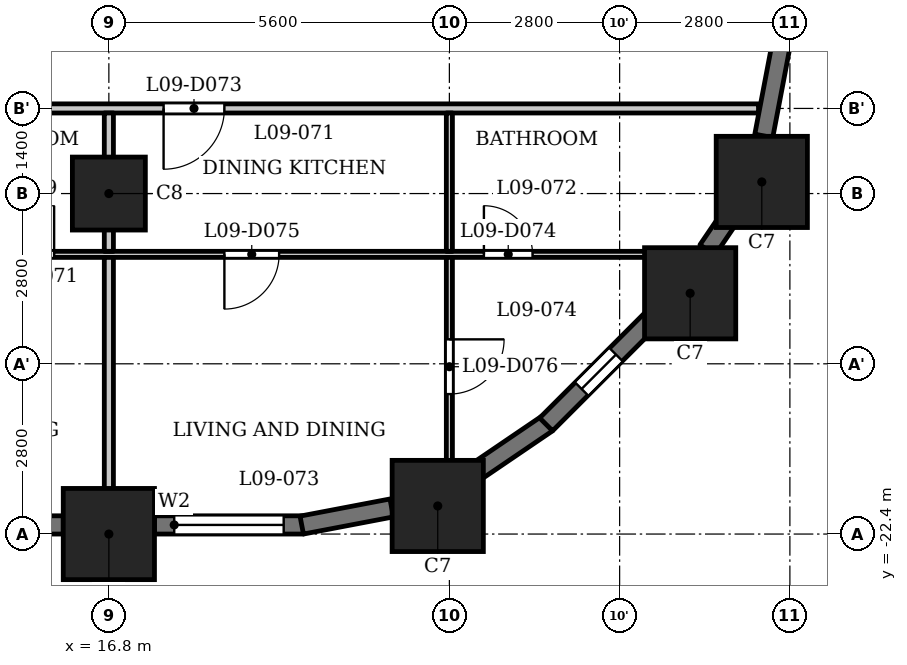
"""IFC4 building model, lengths in metres.
Left out: names, types, materials, properties, quantities, classifications, styles, units other than length and angle.
Written with IfcOpenShell. Run it as: python <this file> out.ifc"""

import sys

from ifc_helpers import new_model, si_unit, direction, frame, frame_2d, origin, origin_2d, place, context, subcontext, project, spatial, rectangle, extrude, element, fill, save


model = new_model("IFC4")
c1 = context("Model", 3, precision=1e-05, world=origin(), true_north=direction((0.0, 1.0)))
c2 = subcontext(c1, "Body", "Model", "MODEL_VIEW")
j1 = project(units=[si_unit("LENGTHUNIT", "METRE"), si_unit("PLANEANGLEUNIT", "RADIAN")], contexts=[c1])
p1 = place(None, origin())
s1 = spatial("IfcSite", under=j1, at=p1, CompositionType="ELEMENT")
p2 = place(p1, origin())
s2 = spatial("IfcBuilding", under=s1, at=p2, CompositionType="ELEMENT")
p3 = place(p2, frame((0.0, 0.0, 41.0)))
s3 = spatial("IfcBuildingStorey", under=s2, at=p3, CompositionType="ELEMENT", Elevation=41.0)
for number, where, z_axis, x_axis in (
    (1, (16.8, -22.4, 0.0), (0.0, 0.0, 1.0), (1.0, 0.0, 0.0)),
    (2, (22.209, -21.938, 0.0), (0.0, 0.0, 1.0), (1.0, 0.0, 0.0)),
    (3, (26.36, -18.44, 0.0), (0.0, 0.0, 1.0), (1.0, 0.0, 0.0)),
    (4, (27.538, -16.609, 0.0), (0.0, 0.0, 1.0), (1.0, 0.0, 0.0)),
):
    element("IfcColumn", number, at=place(p3, frame(where, z_axis=z_axis, x_axis=x_axis)), inside=s3, PredefinedType="COLUMN", context=c2, shape_type="SweptSolid", body=[
        extrude(rectangle(XDim=1.5, YDim=1.5, at=origin_2d()), origin(), (0.0, 0.0, 1.0), 3.5),
    ])
p4 = place(p3, frame((16.8, -16.8, 0.0), z_axis=(0.0, 0.0, 1.0), x_axis=(1.0, 0.0, 0.0)))
e5 = element("IfcColumn", 5, at=p4, inside=s3, PredefinedType="COLUMN", context=c2, shape_type="SweptSolid", body=[
    extrude(rectangle(XDim=1.2, YDim=1.2, at=origin_2d()), origin(), (0.0, 0.0, 1.0), 3.5),
])
p5 = place(p3, frame((11.95, -22.25, 0.0), z_axis=(0.0, 0.0, 1.0), x_axis=(1.0, 0.0, 0.0)))
e6 = element("IfcWall", 6, at=p5, inside=s3, PredefinedType="SOLIDWALL", context=c2, shape_type="SweptSolid", body=[
    extrude(rectangle(XDim=4.1, YDim=0.3, at=frame_2d((2.05, 0.0))), origin(), (0.0, 0.0, 1.0), 2.35),
])
p6 = place(p5, frame((0.75, 0.0, 0.9)))
e7 = element("IfcOpeningElement", 7, at=p6, cuts=e6, PredefinedType="OPENING", context=c2, shape_type="SweptSolid", body=[
    extrude(rectangle(XDim=2.6, YDim=1.25, at=frame_2d((1.3, 0.625))), frame((0.0, 0.16, 0.0), z_axis=(0.0, -1.0, 0.0), x_axis=(1.0, 0.0, 0.0)), (0.0, 0.0, 1.0), 0.32),
])
p7 = place(p3, frame((17.55, -22.25, 0.0), z_axis=(0.0, 0.0, 1.0), x_axis=(1.0, 0.0, 0.0)))
e8 = element("IfcWall", 8, at=p7, inside=s3, PredefinedType="SOLIDWALL", context=c2, shape_type="SweptSolid", body=[
    extrude(rectangle(XDim=2.45, YDim=0.3, at=frame_2d((1.225, 0.0))), origin(), (0.0, 0.0, 1.0), 2.35),
])
p8 = place(p7, frame((0.325, 0.0, 0.9)))
e9 = element("IfcOpeningElement", 9, at=p8, cuts=e8, PredefinedType="OPENING", context=c2, shape_type="SweptSolid", body=[
    extrude(rectangle(XDim=1.8, YDim=1.25, at=frame_2d((0.9, 0.625))), frame((0.0, 0.16, 0.0), z_axis=(0.0, -1.0, 0.0), x_axis=(1.0, 0.0, 0.0)), (0.0, 0.0, 1.0), 0.32),
])
for number, where, z_axis, x_axis in (
    (10, (19.972, -22.253, 0.0), (0.0, 0.0, 1.0), (0.982, 0.187, 0.0)),
    (11, (22.767, -21.426, 0.0), (0.0, 0.0, 1.0), (0.827, 0.562, 0.0)),
):
    element("IfcWall", number, at=place(p3, frame(where, z_axis=z_axis, x_axis=x_axis)), inside=s3, PredefinedType="SOLIDWALL", context=c2, shape_type="SweptSolid", body=[
        extrude(rectangle(XDim=1.506, YDim=0.3, at=frame_2d((0.753, 0.0))), origin(), (0.0, 0.0, 1.0), 2.35),
    ])
p9 = place(p3, frame((23.991, -20.597, 0.0), z_axis=(0.0, 0.0, 1.0), x_axis=(0.707106781187, 0.707106781187, 0.0)))
e12 = element("IfcWall", 12, at=p9, inside=s3, PredefinedType="SOLIDWALL", context=c2, shape_type="SweptSolid", body=[
    extrude(rectangle(XDim=2.45, YDim=0.3, at=frame_2d((1.225, 0.0))), origin(), (0.0, 0.0, 1.0), 2.35),
])
p10 = place(p9, frame((0.825, 0.0, 0.6)))
e13 = element("IfcOpeningElement", 13, at=p10, cuts=e12, PredefinedType="OPENING", context=c2, shape_type="SweptSolid", body=[
    extrude(rectangle(XDim=0.8, YDim=1.55, at=frame_2d((0.4, 0.775))), frame((0.0, 0.16, 0.0), z_axis=(0.0, -1.0, 0.0), x_axis=(1.0, 0.0, 0.0)), (0.0, 0.0, 1.0), 0.32),
])
p11 = place(p3, frame((26.645, -17.727, 0.0), z_axis=(0.0, 0.0, 1.0), x_axis=(0.562083182981, 0.827080706709, 0.0)))
e14 = element("IfcWall", 14, at=p11, inside=s3, PredefinedType="SOLIDWALL", context=c2, shape_type="SweptSolid", body=[
    extrude(rectangle(XDim=0.677, YDim=0.3, at=frame_2d((0.339, 0.0))), origin(), (0.0, 0.0, 1.0), 3.2),
])
p12 = place(p3, frame((27.571, -15.851, 0.0), z_axis=(0.0, 0.0, 1.0), x_axis=(0.187223837635, 0.982317277982, 0.0)))
e15 = element("IfcWall", 15, at=p12, inside=s3, PredefinedType="SOLIDWALL", context=c2, shape_type="SweptSolid", body=[
    extrude(rectangle(XDim=1.506, YDim=0.3, at=frame_2d((0.753, 0.0))), origin(), (0.0, 0.0, 1.0), 2.35),
])
p13 = place(p3, frame((-26.394, -17.8, 0.0), z_axis=(0.0, 0.0, 1.0), x_axis=(1.0, 0.0, 0.0)))
e16 = element("IfcWall", 16, at=p13, inside=s3, PredefinedType="PARTITIONING", context=c2, shape_type="SweptSolid", body=[
    extrude(rectangle(XDim=53.126, YDim=0.1, at=frame_2d((26.563, 0.0))), origin(), (0.0, 0.0, 1.0), 3.2),
])
p14 = place(p13, frame((0.794, 0.0, 0.0)))
e17 = element("IfcOpeningElement", 17, at=p14, cuts=e16, PredefinedType="OPENING", context=c2, shape_type="SweptSolid", body=[
    extrude(rectangle(XDim=0.8, YDim=2.1, at=frame_2d((0.4, 1.05))), frame((0.0, 0.06, 0.0), z_axis=(0.0, -1.0, 0.0), x_axis=(1.0, 0.0, 0.0)), (0.0, 0.0, 1.0), 0.12),
])
p15 = place(p13, frame((5.644, 0.0, 0.0)))
e18 = element("IfcOpeningElement", 18, at=p15, cuts=e16, PredefinedType="OPENING", context=c2, shape_type="SweptSolid", body=[
    extrude(rectangle(XDim=0.9, YDim=2.1, at=frame_2d((0.45, 1.05))), frame((0.0, 0.06, 0.0), z_axis=(0.0, -1.0, 0.0), x_axis=(1.0, 0.0, 0.0)), (0.0, 0.0, 1.0), 0.12),
])
p16 = place(p13, frame((10.394, 0.0, 0.0)))
e19 = element("IfcOpeningElement", 19, at=p16, cuts=e16, PredefinedType="OPENING", context=c2, shape_type="SweptSolid", body=[
    extrude(rectangle(XDim=0.8, YDim=2.1, at=frame_2d((0.4, 1.05))), frame((0.0, 0.06, 0.0), z_axis=(0.0, -1.0, 0.0), x_axis=(1.0, 0.0, 0.0)), (0.0, 0.0, 1.0), 0.12),
])
p17 = place(p13, frame((13.244, 0.0, 0.0)))
e20 = element("IfcOpeningElement", 20, at=p17, cuts=e16, PredefinedType="OPENING", context=c2, shape_type="SweptSolid", body=[
    extrude(rectangle(XDim=0.9, YDim=2.1, at=frame_2d((0.45, 1.05))), frame((0.0, 0.06, 0.0), z_axis=(0.0, -1.0, 0.0), x_axis=(1.0, 0.0, 0.0)), (0.0, 0.0, 1.0), 0.12),
])
p18 = place(p13, frame((23.944, 0.0, 0.0)))
e21 = element("IfcOpeningElement", 21, at=p18, cuts=e16, PredefinedType="OPENING", context=c2, shape_type="SweptSolid", body=[
    extrude(rectangle(XDim=0.8, YDim=2.1, at=frame_2d((0.4, 1.05))), frame((0.0, 0.06, 0.0), z_axis=(0.0, -1.0, 0.0), x_axis=(1.0, 0.0, 0.0)), (0.0, 0.0, 1.0), 0.12),
])
p19 = place(p13, frame((22.194, 0.0, 0.0)))
e22 = element("IfcOpeningElement", 22, at=p19, cuts=e16, PredefinedType="OPENING", context=c2, shape_type="SweptSolid", body=[
    extrude(rectangle(XDim=0.9, YDim=2.1, at=frame_2d((0.45, 1.05))), frame((0.0, 0.06, 0.0), z_axis=(0.0, -1.0, 0.0), x_axis=(1.0, 0.0, 0.0)), (0.0, 0.0, 1.0), 0.12),
])
p20 = place(p13, frame((16.594, 0.0, 0.0)))
e23 = element("IfcOpeningElement", 23, at=p20, cuts=e16, PredefinedType="OPENING", context=c2, shape_type="SweptSolid", body=[
    extrude(rectangle(XDim=0.9, YDim=2.1, at=frame_2d((0.45, 1.05))), frame((0.0, 0.06, 0.0), z_axis=(0.0, -1.0, 0.0), x_axis=(1.0, 0.0, 0.0)), (0.0, 0.0, 1.0), 0.12),
])
p21 = place(p13, frame((18.844, 0.0, 0.0)))
e24 = element("IfcOpeningElement", 24, at=p21, cuts=e16, PredefinedType="OPENING", context=c2, shape_type="SweptSolid", body=[
    extrude(rectangle(XDim=0.9, YDim=2.1, at=frame_2d((0.45, 1.05))), frame((0.0, 0.06, 0.0), z_axis=(0.0, -1.0, 0.0), x_axis=(1.0, 0.0, 0.0)), (0.0, 0.0, 1.0), 0.12),
])
p22 = place(p13, frame((30.544, 0.0, 0.0)))
e25 = element("IfcOpeningElement", 25, at=p22, cuts=e16, PredefinedType="OPENING", context=c2, shape_type="SweptSolid", body=[
    extrude(rectangle(XDim=0.8, YDim=2.1, at=frame_2d((0.4, 1.05))), frame((0.0, 0.06, 0.0), z_axis=(0.0, -1.0, 0.0), x_axis=(1.0, 0.0, 0.0)), (0.0, 0.0, 1.0), 0.12),
])
p23 = place(p13, frame((27.294, 0.0, 0.0)))
e26 = element("IfcOpeningElement", 26, at=p23, cuts=e16, PredefinedType="OPENING", context=c2, shape_type="SweptSolid", body=[
    extrude(rectangle(XDim=0.9, YDim=2.1, at=frame_2d((0.45, 1.05))), frame((0.0, 0.06, 0.0), z_axis=(0.0, -1.0, 0.0), x_axis=(1.0, 0.0, 0.0)), (0.0, 0.0, 1.0), 0.12),
])
p24 = place(p13, frame((35.894, 0.0, 0.0)))
e27 = element("IfcOpeningElement", 27, at=p24, cuts=e16, PredefinedType="OPENING", context=c2, shape_type="SweptSolid", body=[
    extrude(rectangle(XDim=0.8, YDim=2.1, at=frame_2d((0.4, 1.05))), frame((0.0, 0.06, 0.0), z_axis=(0.0, -1.0, 0.0), x_axis=(1.0, 0.0, 0.0)), (0.0, 0.0, 1.0), 0.12),
])
p25 = place(p13, frame((33.644, 0.0, 0.0)))
e28 = element("IfcOpeningElement", 28, at=p25, cuts=e16, PredefinedType="OPENING", context=c2, shape_type="SweptSolid", body=[
    extrude(rectangle(XDim=0.9, YDim=2.1, at=frame_2d((0.45, 1.05))), frame((0.0, 0.06, 0.0), z_axis=(0.0, -1.0, 0.0), x_axis=(1.0, 0.0, 0.0)), (0.0, 0.0, 1.0), 0.12),
])
p26 = place(p13, frame((41.494, 0.0, 0.0)))
e29 = element("IfcOpeningElement", 29, at=p26, cuts=e16, PredefinedType="OPENING", context=c2, shape_type="SweptSolid", body=[
    extrude(rectangle(XDim=0.8, YDim=2.1, at=frame_2d((0.4, 1.05))), frame((0.0, 0.06, 0.0), z_axis=(0.0, -1.0, 0.0), x_axis=(1.0, 0.0, 0.0)), (0.0, 0.0, 1.0), 0.12),
])
p27 = place(p13, frame((38.744, 0.0, 0.0)))
e30 = element("IfcOpeningElement", 30, at=p27, cuts=e16, PredefinedType="OPENING", context=c2, shape_type="SweptSolid", body=[
    extrude(rectangle(XDim=0.9, YDim=2.1, at=frame_2d((0.45, 1.05))), frame((0.0, 0.06, 0.0), z_axis=(0.0, -1.0, 0.0), x_axis=(1.0, 0.0, 0.0)), (0.0, 0.0, 1.0), 0.12),
])
p28 = place(p13, frame((49.362, 0.0, 0.0)))
e31 = element("IfcOpeningElement", 31, at=p28, cuts=e16, PredefinedType="OPENING", context=c2, shape_type="SweptSolid", body=[
    extrude(rectangle(XDim=0.8, YDim=2.1, at=frame_2d((0.4, 1.05))), frame((0.0, 0.06, 0.0), z_axis=(0.0, -1.0, 0.0), x_axis=(1.0, 0.0, 0.0)), (0.0, 0.0, 1.0), 0.12),
])
p29 = place(p13, frame((45.094, 0.0, 0.0)))
e32 = element("IfcOpeningElement", 32, at=p29, cuts=e16, PredefinedType="OPENING", context=c2, shape_type="SweptSolid", body=[
    extrude(rectangle(XDim=0.9, YDim=2.1, at=frame_2d((0.45, 1.05))), frame((0.0, 0.06, 0.0), z_axis=(0.0, -1.0, 0.0), x_axis=(1.0, 0.0, 0.0)), (0.0, 0.0, 1.0), 0.12),
])
p30 = place(p3, frame((-27.484, -15.4, 0.0), z_axis=(0.0, 0.0, 1.0), x_axis=(1.0, 0.0, 0.0)))
e33 = element("IfcWall", 33, at=p30, inside=s3, PredefinedType="PARTITIONING", context=c2, shape_type="SweptSolid", body=[
    extrude(rectangle(XDim=54.968, YDim=0.15, at=frame_2d((27.484, 0.0))), origin(), (0.0, 0.0, 1.0), 3.2),
])
p31 = place(p30, frame((5.734, 0.0, 0.0)))
e34 = element("IfcOpeningElement", 34, at=p31, cuts=e33, PredefinedType="OPENING", context=c2, shape_type="SweptSolid", body=[
    extrude(rectangle(XDim=1.0, YDim=2.1, at=frame_2d((0.5, 1.05))), frame((0.0, 0.085, 0.0), z_axis=(0.0, -1.0, 0.0), x_axis=(1.0, 0.0, 0.0)), (0.0, 0.0, 1.0), 0.17),
])
p32 = place(p30, frame((13.334, 0.0, 0.0)))
e35 = element("IfcOpeningElement", 35, at=p32, cuts=e33, PredefinedType="OPENING", context=c2, shape_type="SweptSolid", body=[
    extrude(rectangle(XDim=1.0, YDim=2.1, at=frame_2d((0.5, 1.05))), frame((0.0, 0.085, 0.0), z_axis=(0.0, -1.0, 0.0), x_axis=(1.0, 0.0, 0.0)), (0.0, 0.0, 1.0), 0.17),
])
p33 = place(p30, frame((20.184, 0.0, 0.0)))
e36 = element("IfcOpeningElement", 36, at=p33, cuts=e33, PredefinedType="OPENING", context=c2, shape_type="SweptSolid", body=[
    extrude(rectangle(XDim=1.0, YDim=2.1, at=frame_2d((0.5, 1.05))), frame((0.0, 0.085, 0.0), z_axis=(0.0, -1.0, 0.0), x_axis=(1.0, 0.0, 0.0)), (0.0, 0.0, 1.0), 0.17),
])
p34 = place(p30, frame((29.384, 0.0, 0.0)))
e37 = element("IfcOpeningElement", 37, at=p34, cuts=e33, PredefinedType="OPENING", context=c2, shape_type="SweptSolid", body=[
    extrude(rectangle(XDim=1.0, YDim=2.1, at=frame_2d((0.5, 1.05))), frame((0.0, 0.085, 0.0), z_axis=(0.0, -1.0, 0.0), x_axis=(1.0, 0.0, 0.0)), (0.0, 0.0, 1.0), 0.17),
])
p35 = place(p30, frame((33.734, 0.0, 0.0)))
e38 = element("IfcOpeningElement", 38, at=p35, cuts=e33, PredefinedType="OPENING", context=c2, shape_type="SweptSolid", body=[
    extrude(rectangle(XDim=1.0, YDim=2.1, at=frame_2d((0.5, 1.05))), frame((0.0, 0.085, 0.0), z_axis=(0.0, -1.0, 0.0), x_axis=(1.0, 0.0, 0.0)), (0.0, 0.0, 1.0), 0.17),
])
p36 = place(p30, frame((39.584, 0.0, 0.0)))
e39 = element("IfcOpeningElement", 39, at=p36, cuts=e33, PredefinedType="OPENING", context=c2, shape_type="SweptSolid", body=[
    extrude(rectangle(XDim=1.0, YDim=2.1, at=frame_2d((0.5, 1.05))), frame((0.0, 0.085, 0.0), z_axis=(0.0, -1.0, 0.0), x_axis=(1.0, 0.0, 0.0)), (0.0, 0.0, 1.0), 0.17),
])
p37 = place(p30, frame((45.184, 0.0, 0.0)))
e40 = element("IfcOpeningElement", 40, at=p37, cuts=e33, PredefinedType="OPENING", context=c2, shape_type="SweptSolid", body=[
    extrude(rectangle(XDim=1.0, YDim=2.1, at=frame_2d((0.5, 1.05))), frame((0.0, 0.085, 0.0), z_axis=(0.0, -1.0, 0.0), x_axis=(1.0, 0.0, 0.0)), (0.0, 0.0, 1.0), 0.17),
])
p38 = place(p3, frame((16.8, -23.13, 0.0), z_axis=(0.0, 0.0, 1.0), x_axis=(0.0, 1.0, 0.0)))
e41 = element("IfcWall", 41, at=p38, inside=s3, PredefinedType="PARTITIONING", context=c2, shape_type="SweptSolid", body=[
    extrude(rectangle(XDim=5.28, YDim=0.15, at=frame_2d((2.64, 0.0))), origin(), (0.0, 0.0, 1.0), 3.2),
])
p39 = place(p3, frame((16.8, -17.75, 0.0), z_axis=(0.0, 0.0, 1.0), x_axis=(0.0, 1.0, 0.0)))
e42 = element("IfcWall", 42, at=p39, inside=s3, PredefinedType="PARTITIONING", context=c2, shape_type="SweptSolid", body=[
    extrude(rectangle(XDim=2.275, YDim=0.15, at=frame_2d((1.137, 0.0))), origin(), (0.0, 0.0, 1.0), 3.2),
])
p40 = place(p3, frame((22.4, -21.72, 0.0), z_axis=(0.0, 0.0, 1.0), x_axis=(0.0, 1.0, 0.0)))
e43 = element("IfcWall", 43, at=p40, inside=s3, PredefinedType="PARTITIONING", context=c2, shape_type="SweptSolid", body=[
    extrude(rectangle(XDim=3.87, YDim=0.1, at=frame_2d((1.935, 0.0))), origin(), (0.0, 0.0, 1.0), 3.2),
])
p41 = place(p40, frame((1.622, 0.0, 0.0)))
e44 = element("IfcOpeningElement", 44, at=p41, cuts=e43, PredefinedType="OPENING", context=c2, shape_type="SweptSolid", body=[
    extrude(rectangle(XDim=0.9, YDim=2.1, at=frame_2d((0.45, 1.05))), frame((0.0, 0.06, 0.0), z_axis=(0.0, -1.0, 0.0), x_axis=(1.0, 0.0, 0.0)), (0.0, 0.0, 1.0), 0.12),
])
p42 = place(p3, frame((22.4, -17.75, 0.0), z_axis=(0.0, 0.0, 1.0), x_axis=(0.0, 1.0, 0.0)))
e45 = element("IfcWall", 45, at=p42, inside=s3, PredefinedType="PARTITIONING", context=c2, shape_type="SweptSolid", body=[
    extrude(rectangle(XDim=2.275, YDim=0.1, at=frame_2d((1.137, 0.0))), origin(), (0.0, 0.0, 1.0), 3.2),
])
p43 = place(p26, origin())
e46 = element("IfcDoor", 46, at=p43, inside=s3, OperationType="SINGLE_SWING_LEFT", PredefinedType="DOOR", context=c2, shape_type="SweptSolid", body=[
    extrude(rectangle(XDim=0.8, YDim=2.1, at=frame_2d((0.4, 1.05))), frame((0.0, 0.025, 0.0), z_axis=(0.0, -1.0, 0.0), x_axis=(1.0, 0.0, 0.0)), (0.0, 0.0, 1.0), 0.05),
])
fill(e29, e46)
p44 = place(p37, origin())
e47 = element("IfcDoor", 47, at=p44, inside=s3, OperationType="SINGLE_SWING_LEFT", PredefinedType="DOOR", context=c2, shape_type="SweptSolid", body=[
    extrude(rectangle(XDim=1.0, YDim=2.1, at=frame_2d((0.5, 1.05))), frame((0.0, 0.025, 0.0), z_axis=(0.0, -1.0, 0.0), x_axis=(1.0, 0.0, 0.0)), (0.0, 0.0, 1.0), 0.05),
])
fill(e40, e47)
p45 = place(p28, origin())
e48 = element("IfcDoor", 48, at=p45, inside=s3, OperationType="SINGLE_SWING_RIGHT", PredefinedType="DOOR", context=c2, shape_type="SweptSolid", body=[
    extrude(rectangle(XDim=0.8, YDim=2.1, at=frame_2d((0.4, 1.05))), frame((0.0, 0.025, 0.0), z_axis=(0.0, -1.0, 0.0), x_axis=(1.0, 0.0, 0.0)), (0.0, 0.0, 1.0), 0.05),
])
fill(e31, e48)
p46 = place(p29, origin())
e49 = element("IfcDoor", 49, at=p46, inside=s3, OperationType="SINGLE_SWING_LEFT", PredefinedType="DOOR", context=c2, shape_type="SweptSolid", body=[
    extrude(rectangle(XDim=0.9, YDim=2.1, at=frame_2d((0.45, 1.05))), frame((0.0, 0.025, 0.0), z_axis=(0.0, -1.0, 0.0), x_axis=(1.0, 0.0, 0.0)), (0.0, 0.0, 1.0), 0.05),
])
fill(e32, e49)
p47 = place(p41, origin())
e50 = element("IfcDoor", 50, at=p47, inside=s3, OperationType="SINGLE_SWING_RIGHT", PredefinedType="DOOR", context=c2, shape_type="SweptSolid", body=[
    extrude(rectangle(XDim=0.9, YDim=2.1, at=frame_2d((0.45, 1.05))), frame((0.0, 0.025, 0.0), z_axis=(0.0, -1.0, 0.0), x_axis=(1.0, 0.0, 0.0)), (0.0, 0.0, 1.0), 0.05),
])
fill(e44, e50)
p48 = place(p8, origin())
e51 = element("IfcWindow", 51, at=p48, inside=s3, PartitioningType="SINGLE_PANEL", PredefinedType="WINDOW", context=c2, shape_type="SweptSolid", body=[
    extrude(rectangle(XDim=1.8, YDim=1.25, at=frame_2d((0.9, 0.625))), frame((0.0, 0.03, 0.0), z_axis=(0.0, -1.0, 0.0), x_axis=(1.0, 0.0, 0.0)), (0.0, 0.0, 1.0), 0.06),
])
fill(e9, e51)
p49 = place(p10, origin())
e52 = element("IfcWindow", 52, at=p49, inside=s3, PartitioningType="SINGLE_PANEL", PredefinedType="WINDOW", context=c2, shape_type="SweptSolid", body=[
    extrude(rectangle(XDim=0.8, YDim=1.55, at=frame_2d((0.4, 0.775))), frame((0.0, 0.03, 0.0), z_axis=(0.0, -1.0, 0.0), x_axis=(1.0, 0.0, 0.0)), (0.0, 0.0, 1.0), 0.06),
])
fill(e13, e52)
save(model, sys.argv[1])
